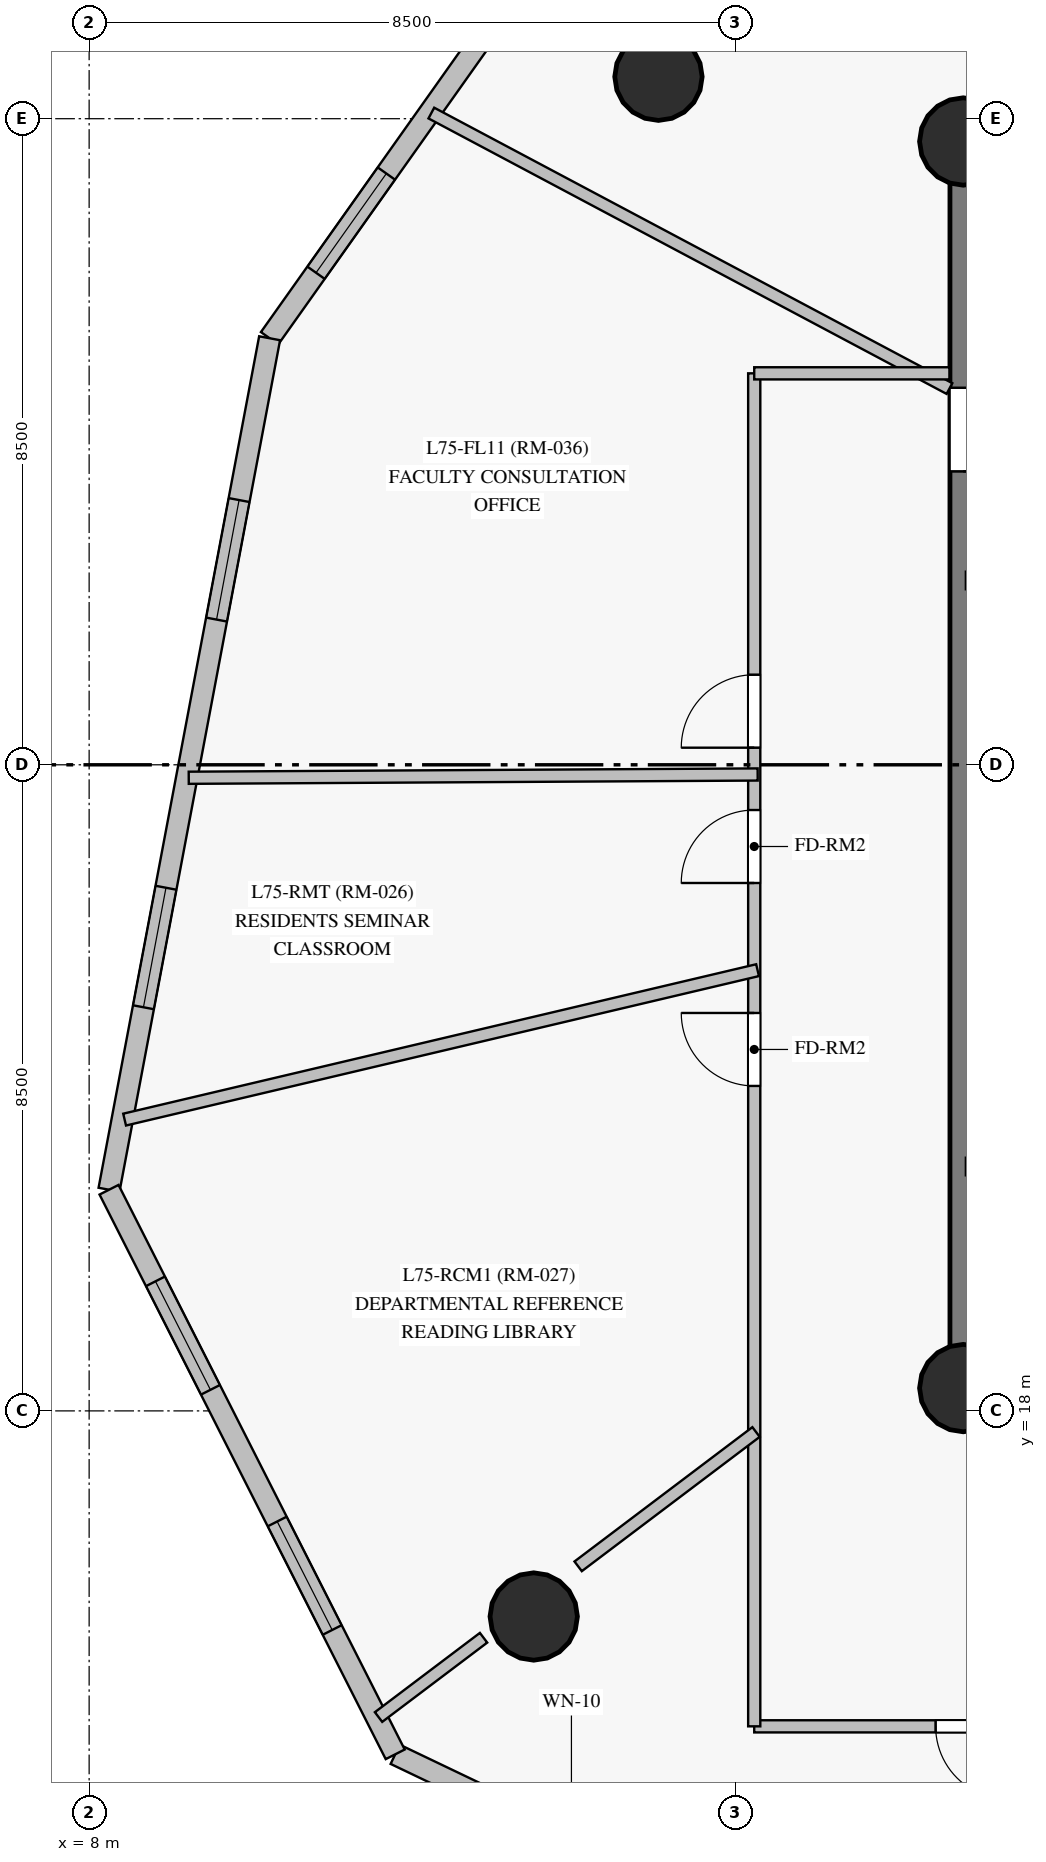
"""IFC4 building model, lengths in metres.
Left out: names, types, materials, properties, quantities, classifications, styles, units other than length and angle.
Written with IfcOpenShell. Run it as: python <this file> out.ifc"""

import sys

from ifc_helpers import new_model, si_unit, direction, frame, frame_2d, origin, origin_with_axes, origin_2d, place, context, subcontext, project, spatial, rectangle, circle, extrude, source, transform, mapped, element, fill, save


model = new_model("IFC4")
c1 = context("Model", 3, precision=1e-05, world=origin(), true_north=direction((0.0, 1.0)))
c2 = subcontext(c1, "Body", "Model", "MODEL_VIEW")
j1 = project(units=[si_unit("LENGTHUNIT", "METRE"), si_unit("PLANEANGLEUNIT", "RADIAN")], contexts=[c1])
p1 = place(None, origin())
s1 = spatial("IfcSite", under=j1, at=p1, CompositionType="ELEMENT")
p2 = place(p1, origin())
s2 = spatial("IfcBuilding", under=s1, at=p2, CompositionType="ELEMENT")
p3 = place(p2, frame((0.0, 0.0, 253.5)))
s3 = spatial("IfcBuildingStorey", under=s2, at=p3, CompositionType="ELEMENT", Elevation=253.5)
p4 = place(p3, frame((19.5, 18.3, 0.0), z_axis=(0.0, 0.0, 1.0), x_axis=(1.0, 0.0, 0.0)))
e1 = element("IfcWall", 1, at=p4, inside=s3, PredefinedType="SHEAR", context=c2, shape_type="SweptSolid", body=[
    extrude(rectangle(XDim=7.05, YDim=0.35, at=frame_2d((3.525, 0.0))), origin(), (0.0, 0.0, 1.0), 2.85),
])
p5 = place(p4, frame((4.2, 0.0, 0.0)))
e2 = element("IfcOpeningElement", 2, at=p5, cuts=e1, PredefinedType="OPENING", context=c2, shape_type="SweptSolid", body=[
    extrude(rectangle(XDim=1.4, YDim=2.2, at=frame_2d((0.7, 1.1))), frame((0.0, 0.185, 0.0), z_axis=(0.0, -1.0, 0.0), x_axis=(1.0, 0.0, 0.0)), (0.0, 0.0, 1.0), 0.37),
])
p6 = place(p3, frame((26.55, 34.7, 0.0), z_axis=(0.0, 0.0, 1.0), x_axis=(-1.0, 0.0, 0.0)))
e3 = element("IfcWall", 3, at=p6, inside=s3, PredefinedType="SHEAR", context=c2, shape_type="SweptSolid", body=[
    extrude(rectangle(XDim=7.05, YDim=0.35, at=frame_2d((3.525, 0.0))), origin(), (0.0, 0.0, 1.0), 2.85),
])
p7 = place(p3, frame((19.5, 34.7, 0.0), z_axis=(0.0, 0.0, 1.0), x_axis=(0.0, -1.0, 0.0)))
e4 = element("IfcWall", 4, at=p7, inside=s3, PredefinedType="SHEAR", context=c2, shape_type="SweptSolid", body=[
    extrude(rectangle(XDim=16.4, YDim=0.35, at=frame_2d((8.2, 0.0))), origin(), (0.0, 0.0, 1.0), 2.85),
])
p8 = place(p7, frame((3.24, 0.0, 0.0)))
e5 = element("IfcOpeningElement", 5, at=p8, cuts=e4, PredefinedType="OPENING", context=c2, shape_type="SweptSolid", body=[
    extrude(rectangle(XDim=1.1, YDim=2.15, at=frame_2d((0.55, 1.075))), frame((0.0, 0.185, 0.0), z_axis=(0.0, -1.0, 0.0), x_axis=(1.0, 0.0, 0.0)), (0.0, 0.0, 1.0), 0.37),
])
m1 = source(origin_with_axes(), c2, "Body", "SweptSolid", [
    extrude(circle(Radius=0.575, at=origin_2d()), origin(), (0.0, 0.0, 1.0), 3.05),
])
for number, where, z_axis, x_axis in (
    (6, (19.5, 18.3, 0.0), (0.0, 0.0, 1.0), (1.0, 0.0, 0.0)),
    (7, (19.5, 34.7, 0.0), (0.0, 0.0, 1.0), (1.0, 0.0, 0.0)),
    (8, (15.49, 35.552, 0.0), (0.0, 0.0, 1.0), (1.0, 0.0, 0.0)),
    (9, (13.849, 15.295, 0.0), (0.0, 0.0, 1.0), (1.0, 0.0, 0.0)),
):
    element("IfcColumn", number, at=place(p3, frame(where, z_axis=z_axis, x_axis=x_axis)), inside=s3, PredefinedType="COLUMN", context=c2, shape_type="MappedRepresentation", body=[
        mapped(m1, transform((0.0, 0.0, 0.0), scale=1.0)),
    ])
p9 = place(p3, frame((12.027, 13.482, 0.0), z_axis=(0.0, 0.0, 1.0), x_axis=(0.902132409452, -0.431459286395, 0.0)))
e10 = element("IfcWall", 10, at=p9, inside=s3, PredefinedType="SOLIDWALL", context=c2, shape_type="SweptSolid", body=[
    extrude(rectangle(XDim=11.4, YDim=0.28, at=frame_2d((5.7, 0.0))), origin(), (0.0, 0.0, 1.0), 2.85),
])
p10 = place(p9, frame((1.77, 0.0, 0.85)))
e11 = element("IfcOpeningElement", 11, at=p10, cuts=e10, PredefinedType="OPENING", context=c2, shape_type="SweptSolid", body=[
    extrude(rectangle(XDim=1.6, YDim=1.6, at=frame_2d((0.8, 0.8))), frame((0.0, 0.15, 0.0), z_axis=(0.0, -1.0, 0.0), x_axis=(1.0, 0.0, 0.0)), (0.0, 0.0, 1.0), 0.3),
])
p11 = place(p9, frame((6.149, 0.0, 0.85)))
e12 = element("IfcOpeningElement", 12, at=p11, cuts=e10, PredefinedType="OPENING", context=c2, shape_type="SweptSolid", body=[
    extrude(rectangle(XDim=1.6, YDim=1.6, at=frame_2d((0.8, 0.8))), frame((0.0, 0.15, 0.0), z_axis=(0.0, -1.0, 0.0), x_axis=(1.0, 0.0, 0.0)), (0.0, 0.0, 1.0), 0.3),
])
p12 = place(p9, frame((9.924, 0.0, 0.85)))
e13 = element("IfcOpeningElement", 13, at=p12, cuts=e10, PredefinedType="OPENING", context=c2, shape_type="SweptSolid", body=[
    extrude(rectangle(XDim=0.95, YDim=1.5, at=frame_2d((0.475, 0.75))), frame((0.0, 0.15, 0.0), z_axis=(0.0, -1.0, 0.0), x_axis=(1.0, 0.0, 0.0)), (0.0, 0.0, 1.0), 0.3),
])
p13 = place(p3, frame((15.551, 39.414, 0.0), z_axis=(0.0, 0.0, 1.0), x_axis=(-0.578339677035, -0.815796063956, 0.0)))
e14 = element("IfcWall", 14, at=p13, inside=s3, PredefinedType="SOLIDWALL", context=c2, shape_type="SweptSolid", body=[
    extrude(rectangle(XDim=8.951, YDim=0.28, at=frame_2d((4.476, 0.0))), origin(), (0.0, 0.0, 1.0), 2.85),
])
p14 = place(p13, frame((1.879, 0.0, 0.85)))
e15 = element("IfcOpeningElement", 15, at=p14, cuts=e14, PredefinedType="OPENING", context=c2, shape_type="SweptSolid", body=[
    extrude(rectangle(XDim=1.6, YDim=1.6, at=frame_2d((0.8, 0.8))), frame((0.0, 0.15, 0.0), z_axis=(0.0, -1.0, 0.0), x_axis=(1.0, 0.0, 0.0)), (0.0, 0.0, 1.0), 0.3),
])
p15 = place(p13, frame((6.295, 0.0, 0.85)))
e16 = element("IfcOpeningElement", 16, at=p15, cuts=e14, PredefinedType="OPENING", context=c2, shape_type="SweptSolid", body=[
    extrude(rectangle(XDim=1.6, YDim=1.6, at=frame_2d((0.8, 0.8))), frame((0.0, 0.15, 0.0), z_axis=(0.0, -1.0, 0.0), x_axis=(1.0, 0.0, 0.0)), (0.0, 0.0, 1.0), 0.3),
])
p16 = place(p3, frame((10.374, 32.112, 0.0), z_axis=(0.0, 0.0, 1.0), x_axis=(-0.185313823181, -0.982679391734, 0.0)))
e17 = element("IfcWall", 17, at=p16, inside=s3, PredefinedType="SOLIDWALL", context=c2, shape_type="SweptSolid", body=[
    extrude(rectangle(XDim=11.4, YDim=0.28, at=frame_2d((5.7, 0.0))), origin(), (0.0, 0.0, 1.0), 2.85),
])
p17 = place(p16, frame((2.166, 0.0, 0.85)))
e18 = element("IfcOpeningElement", 18, at=p17, cuts=e17, PredefinedType="OPENING", context=c2, shape_type="SweptSolid", body=[
    extrude(rectangle(XDim=1.6, YDim=1.6, at=frame_2d((0.8, 0.8))), frame((0.0, 0.15, 0.0), z_axis=(0.0, -1.0, 0.0), x_axis=(1.0, 0.0, 0.0)), (0.0, 0.0, 1.0), 0.3),
])
p18 = place(p16, frame((7.357, 0.0, 0.85)))
e19 = element("IfcOpeningElement", 19, at=p18, cuts=e17, PredefinedType="OPENING", context=c2, shape_type="SweptSolid", body=[
    extrude(rectangle(XDim=1.6, YDim=1.6, at=frame_2d((0.8, 0.8))), frame((0.0, 0.15, 0.0), z_axis=(0.0, -1.0, 0.0), x_axis=(1.0, 0.0, 0.0)), (0.0, 0.0, 1.0), 0.3),
])
p19 = place(p3, frame((8.262, 20.909, 0.0), z_axis=(0.0, 0.0, 1.0), x_axis=(0.452132129268, -0.891950972691, 0.0)))
e20 = element("IfcWall", 20, at=p19, inside=s3, PredefinedType="SOLIDWALL", context=c2, shape_type="SweptSolid", body=[
    extrude(rectangle(XDim=8.327, YDim=0.28, at=frame_2d((4.164, 0.0))), origin(), (0.0, 0.0, 1.0), 2.85),
])
p20 = place(p19, frame((1.351, 0.0, 0.85)))
e21 = element("IfcOpeningElement", 21, at=p20, cuts=e20, PredefinedType="OPENING", context=c2, shape_type="SweptSolid", body=[
    extrude(rectangle(XDim=1.6, YDim=1.6, at=frame_2d((0.8, 0.8))), frame((0.0, 0.15, 0.0), z_axis=(0.0, -1.0, 0.0), x_axis=(1.0, 0.0, 0.0)), (0.0, 0.0, 1.0), 0.3),
])
p21 = place(p19, frame((4.893, 0.0, 0.85)))
e22 = element("IfcOpeningElement", 22, at=p21, cuts=e20, PredefinedType="OPENING", context=c2, shape_type="SweptSolid", body=[
    extrude(rectangle(XDim=1.6, YDim=1.6, at=frame_2d((0.8, 0.8))), frame((0.0, 0.15, 0.0), z_axis=(0.0, -1.0, 0.0), x_axis=(1.0, 0.0, 0.0)), (0.0, 0.0, 1.0), 0.3),
])
p22 = place(p3, frame((41.8, 13.85, 0.0), z_axis=(0.0, 0.0, 1.0), x_axis=(-1.0, 0.0, 0.0)))
e23 = element("IfcWall", 23, at=p22, inside=s3, PredefinedType="PARTITIONING", context=c2, shape_type="SweptSolid", body=[
    extrude(rectangle(XDim=25.05, YDim=0.16, at=frame_2d((12.525, 0.0))), origin(), (0.0, 0.0, 1.0), 2.3),
])
p23 = place(p22, frame((21.704, 0.0, 0.0)))
e24 = element("IfcOpeningElement", 24, at=p23, cuts=e23, PredefinedType="OPENING", context=c2, shape_type="SweptSolid", body=[
    extrude(rectangle(XDim=0.96, YDim=2.15, at=frame_2d((0.48, 1.075))), frame((0.0, 0.09, 0.0), z_axis=(0.0, -1.0, 0.0), x_axis=(1.0, 0.0, 0.0)), (0.0, 0.0, 1.0), 0.18),
])
p24 = place(p22, frame((16.298, 0.0, 0.0)))
e25 = element("IfcOpeningElement", 25, at=p24, cuts=e23, PredefinedType="OPENING", context=c2, shape_type="SweptSolid", body=[
    extrude(rectangle(XDim=0.96, YDim=2.15, at=frame_2d((0.48, 1.075))), frame((0.0, 0.09, 0.0), z_axis=(0.0, -1.0, 0.0), x_axis=(1.0, 0.0, 0.0)), (0.0, 0.0, 1.0), 0.18),
])
p25 = place(p22, frame((12.05, 0.0, 0.0)))
e26 = element("IfcOpeningElement", 26, at=p25, cuts=e23, PredefinedType="OPENING", context=c2, shape_type="SweptSolid", body=[
    extrude(rectangle(XDim=0.96, YDim=2.15, at=frame_2d((0.48, 1.075))), frame((0.0, 0.09, 0.0), z_axis=(0.0, -1.0, 0.0), x_axis=(1.0, 0.0, 0.0)), (0.0, 0.0, 1.0), 0.18),
])
p26 = place(p22, frame((8.292, 0.0, 0.0)))
e27 = element("IfcOpeningElement", 27, at=p26, cuts=e23, PredefinedType="OPENING", context=c2, shape_type="SweptSolid", body=[
    extrude(rectangle(XDim=0.96, YDim=2.15, at=frame_2d((0.48, 1.075))), frame((0.0, 0.09, 0.0), z_axis=(0.0, -1.0, 0.0), x_axis=(1.0, 0.0, 0.0)), (0.0, 0.0, 1.0), 0.18),
])
p27 = place(p3, frame((16.75, 13.85, 0.0), z_axis=(0.0, 0.0, 1.0), x_axis=(0.0, 1.0, 0.0)))
e28 = element("IfcWall", 28, at=p27, inside=s3, PredefinedType="PARTITIONING", context=c2, shape_type="SweptSolid", body=[
    extrude(rectangle(XDim=17.8, YDim=0.16, at=frame_2d((8.9, 0.0))), origin(), (0.0, 0.0, 1.0), 2.45),
])
p28 = place(p27, frame((11.095, 0.0, 0.0)))
e29 = element("IfcOpeningElement", 29, at=p28, cuts=e28, PredefinedType="OPENING", context=c2, shape_type="SweptSolid", body=[
    extrude(rectangle(XDim=0.96, YDim=2.15, at=frame_2d((0.48, 1.075))), frame((0.0, 0.09, 0.0), z_axis=(0.0, -1.0, 0.0), x_axis=(1.0, 0.0, 0.0)), (0.0, 0.0, 1.0), 0.18),
])
p29 = place(p27, frame((8.425, 0.0, 0.0)))
e30 = element("IfcOpeningElement", 30, at=p29, cuts=e28, PredefinedType="OPENING", context=c2, shape_type="SweptSolid", body=[
    extrude(rectangle(XDim=0.96, YDim=2.15, at=frame_2d((0.48, 1.075))), frame((0.0, 0.09, 0.0), z_axis=(0.0, -1.0, 0.0), x_axis=(1.0, 0.0, 0.0)), (0.0, 0.0, 1.0), 0.18),
])
p30 = place(p27, frame((12.875, 0.0, 0.0)))
e31 = element("IfcOpeningElement", 31, at=p30, cuts=e28, PredefinedType="OPENING", context=c2, shape_type="SweptSolid", body=[
    extrude(rectangle(XDim=0.96, YDim=2.15, at=frame_2d((0.48, 1.075))), frame((0.0, 0.09, 0.0), z_axis=(0.0, -1.0, 0.0), x_axis=(1.0, 0.0, 0.0)), (0.0, 0.0, 1.0), 0.18),
])
p31 = place(p3, frame((16.794, 23.798, 0.0), z_axis=(0.0, 0.0, 1.0), x_axis=(-0.973246248969, -0.229764529179, 0.0)))
e32 = element("IfcWall", 32, at=p31, inside=s3, PredefinedType="PARTITIONING", context=c2, shape_type="SweptSolid", body=[
    extrude(rectangle(XDim=8.556, YDim=0.16, at=frame_2d((4.278, 0.0))), origin(), (0.0, 0.0, 1.0), 2.85),
])
p32 = place(p3, frame((9.31, 26.329, 0.0), z_axis=(0.0, 0.0, 1.0), x_axis=(0.999983334512, 0.005773274519, 0.0)))
e33 = element("IfcWall", 33, at=p32, inside=s3, PredefinedType="PARTITIONING", context=c2, shape_type="SweptSolid", body=[
    extrude(rectangle(XDim=7.485, YDim=0.16, at=frame_2d((3.743, 0.0))), origin(), (0.0, 0.0, 1.0), 2.85),
])
p33 = place(p3, frame((19.319, 31.45, 0.0), z_axis=(0.0, 0.0, 1.0), x_axis=(-0.882945745121, 0.469475037859, 0.0)))
e34 = element("IfcWall", 34, at=p33, inside=s3, PredefinedType="PARTITIONING", context=c2, shape_type="SweptSolid", body=[
    extrude(rectangle(XDim=7.72, YDim=0.16, at=frame_2d((3.86, 0.0))), origin(), (0.0, 0.0, 1.0), 2.85),
])
p34 = place(p3, frame((16.774, 17.722, 0.0), z_axis=(0.0, 0.0, 1.0), x_axis=(-0.798087936227, -0.602540991177, 0.0)))
e35 = element("IfcWall", 35, at=p34, inside=s3, PredefinedType="PARTITIONING", context=c2, shape_type="SweptSolid", body=[
    extrude(rectangle(XDim=2.933, YDim=0.16, at=frame_2d((1.466, 0.0))), origin(), (0.0, 0.0, 1.0), 2.35),
])
p35 = place(p3, frame((16.75, 31.65, 0.0), z_axis=(0.0, 0.0, 1.0), x_axis=(1.0, 0.0, 0.0)))
e36 = element("IfcWall", 36, at=p35, inside=s3, PredefinedType="PARTITIONING", context=c2, shape_type="SweptSolid", body=[
    extrude(rectangle(XDim=2.568, YDim=0.16, at=frame_2d((1.284, 0.0))), origin(), (0.0, 0.0, 1.0), 2.85),
])
p36 = place(p3, frame((13.189, 15.015, 0.0), z_axis=(0.0, 0.0, 1.0), x_axis=(-0.798117491575, -0.602501842023, 0.0)))
e37 = element("IfcWall", 37, at=p36, inside=s3, PredefinedType="PARTITIONING", context=c2, shape_type="SweptSolid", body=[
    extrude(rectangle(XDim=1.731, YDim=0.16, at=frame_2d((0.865, 0.0))), origin(), (0.0, 0.0, 1.0), 2.85),
])
m2 = source(origin_with_axes(), c2, "Body", "SweptSolid", [
    extrude(rectangle(XDim=1.6, YDim=1.6, at=frame_2d((0.8, 0.8))), frame((0.0, 0.03, 0.0), z_axis=(0.0, -1.0, 0.0), x_axis=(1.0, 0.0, 0.0)), (0.0, 0.0, 1.0), 0.06),
])
p37 = place(p15, origin())
e38 = element("IfcWindow", 38, at=p37, inside=s3, PartitioningType="SINGLE_PANEL", PredefinedType="WINDOW", context=c2, shape_type="MappedRepresentation", body=[
    mapped(m2, transform((0.0, 0.0, 0.0), scale=1.0)),
])
fill(e16, e38)
p38 = place(p17, origin())
e39 = element("IfcWindow", 39, at=p38, inside=s3, PartitioningType="SINGLE_PANEL", PredefinedType="WINDOW", context=c2, shape_type="MappedRepresentation", body=[
    mapped(m2, transform((0.0, 0.0, 0.0), scale=1.0)),
])
fill(e18, e39)
p39 = place(p18, origin())
e40 = element("IfcWindow", 40, at=p39, inside=s3, PartitioningType="SINGLE_PANEL", PredefinedType="WINDOW", context=c2, shape_type="MappedRepresentation", body=[
    mapped(m2, transform((0.0, 0.0, 0.0), scale=1.0)),
])
fill(e19, e40)
p40 = place(p20, origin())
e41 = element("IfcWindow", 41, at=p40, inside=s3, PartitioningType="SINGLE_PANEL", PredefinedType="WINDOW", context=c2, shape_type="MappedRepresentation", body=[
    mapped(m2, transform((0.0, 0.0, 0.0), scale=1.0)),
])
fill(e21, e41)
p41 = place(p21, origin())
e42 = element("IfcWindow", 42, at=p41, inside=s3, PartitioningType="SINGLE_PANEL", PredefinedType="WINDOW", context=c2, shape_type="MappedRepresentation", body=[
    mapped(m2, transform((0.0, 0.0, 0.0), scale=1.0)),
])
fill(e22, e42)
m3 = source(origin_with_axes(), c2, "Body", "SweptSolid", [
    extrude(rectangle(XDim=1.1, YDim=2.15, at=frame_2d((0.55, 1.075))), frame((0.0, 0.025, 0.0), z_axis=(0.0, -1.0, 0.0), x_axis=(1.0, 0.0, 0.0)), (0.0, 0.0, 1.0), 0.05),
])
p42 = place(p8, origin())
e43 = element("IfcDoor", 43, at=p42, inside=s3, OperationType="SINGLE_SWING_RIGHT", PredefinedType="DOOR", context=c2, shape_type="MappedRepresentation", body=[
    mapped(m3, transform((0.0, 0.0, 0.0), scale=1.0)),
])
fill(e5, e43)
m4 = source(origin_with_axes(), c2, "Body", "SweptSolid", [
    extrude(rectangle(XDim=0.96, YDim=2.15, at=frame_2d((0.48, 1.075))), frame((0.0, 0.025, 0.0), z_axis=(0.0, -1.0, 0.0), x_axis=(1.0, 0.0, 0.0)), (0.0, 0.0, 1.0), 0.05),
])
p43 = place(p28, origin())
e44 = element("IfcDoor", 44, at=p43, inside=s3, OperationType="SINGLE_SWING_LEFT", PredefinedType="DOOR", context=c2, shape_type="MappedRepresentation", body=[
    mapped(m4, transform((0.0, 0.0, 0.0), scale=1.0)),
])
fill(e29, e44)
p44 = place(p29, origin())
e45 = element("IfcDoor", 45, at=p44, inside=s3, OperationType="SINGLE_SWING_RIGHT", PredefinedType="DOOR", context=c2, shape_type="MappedRepresentation", body=[
    mapped(m4, transform((0.0, 0.0, 0.0), scale=1.0)),
])
fill(e30, e45)
p45 = place(p23, origin())
e46 = element("IfcDoor", 46, at=p45, inside=s3, OperationType="SINGLE_SWING_LEFT", PredefinedType="DOOR", context=c2, shape_type="MappedRepresentation", body=[
    mapped(m4, transform((0.0, 0.0, 0.0), scale=1.0)),
])
fill(e24, e46)
p46 = place(p30, origin())
e47 = element("IfcDoor", 47, at=p46, inside=s3, OperationType="SINGLE_SWING_LEFT", PredefinedType="DOOR", context=c2, shape_type="MappedRepresentation", body=[
    mapped(m4, transform((0.0, 0.0, 0.0), scale=1.0)),
])
fill(e31, e47)
save(model, sys.argv[1])
